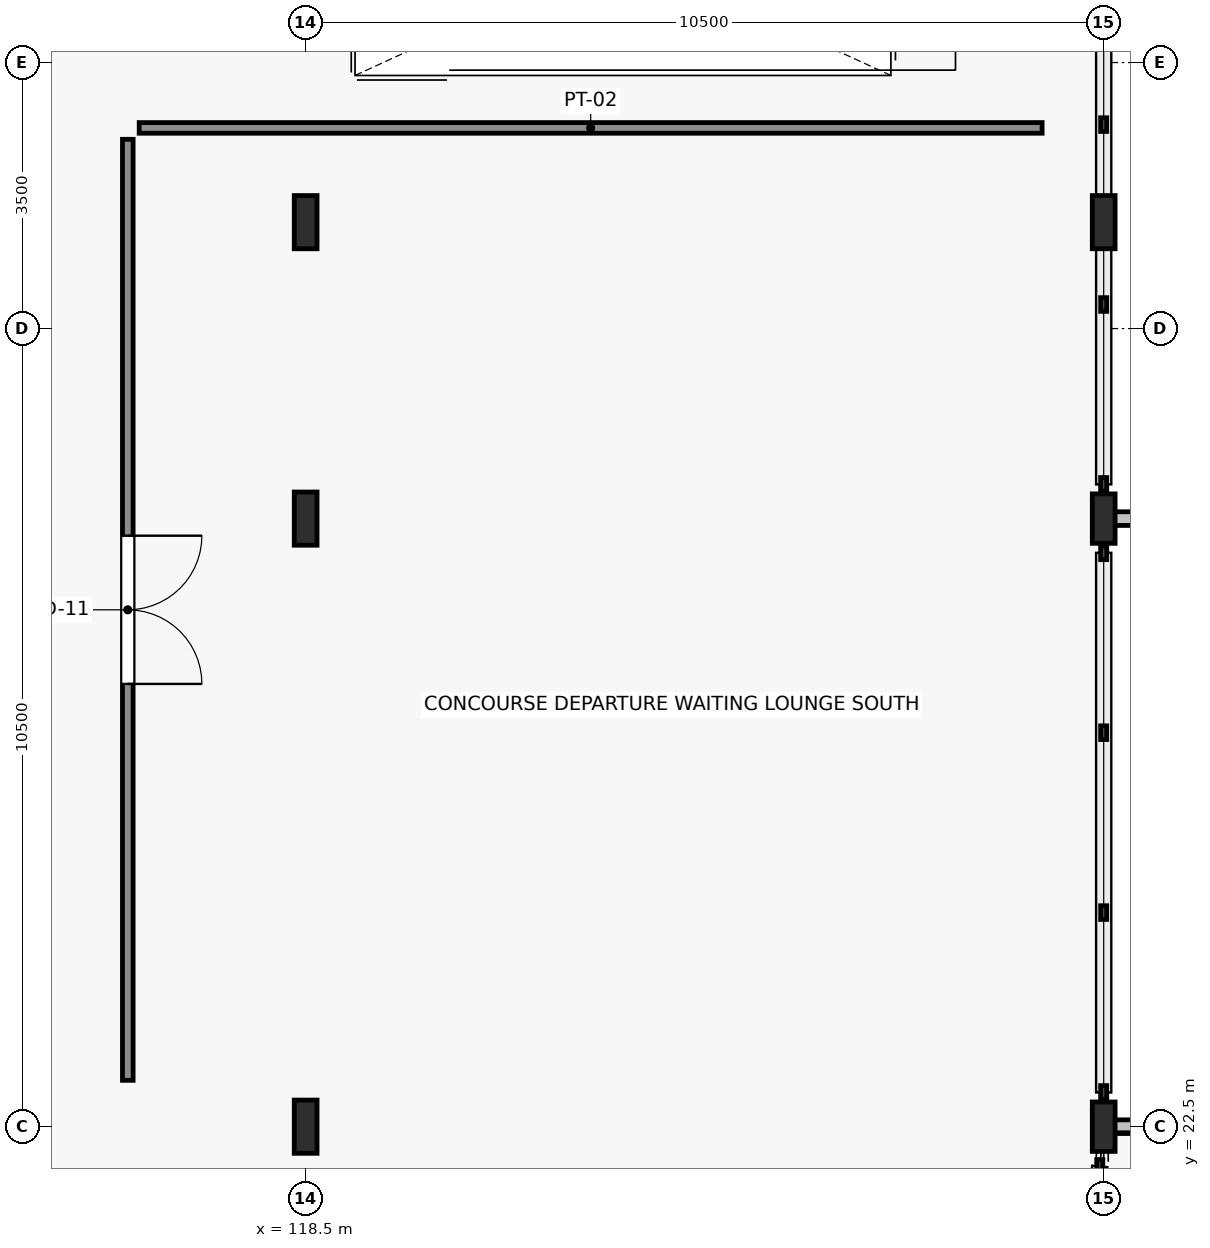
"""IFC4 building model, lengths in metres.
Left out: names, types, materials, properties, quantities, classifications, styles, units other than length and angle.
Written with IfcOpenShell. Run it as: python <this file> out.ifc"""

import sys

from ifc_helpers import new_model, si_unit, direction, frame, frame_2d, origin, origin_2d, place, context, subcontext, project, spatial, rectangle, i_section, extrude, element, fill, save


model = new_model("IFC4")
c1 = context("Model", 3, precision=1e-05, world=origin(), true_north=direction((0.0, 1.0)))
c2 = subcontext(c1, "Body", "Model", "MODEL_VIEW")
j1 = project(units=[si_unit("LENGTHUNIT", "METRE"), si_unit("PLANEANGLEUNIT", "RADIAN")], contexts=[c1])
p1 = place(None, origin())
s1 = spatial("IfcSite", under=j1, at=p1, CompositionType="ELEMENT")
p2 = place(p1, origin())
s2 = spatial("IfcBuilding", under=s1, at=p2, CompositionType="ELEMENT")
p3 = place(p2, frame((0.0, 0.0, 9.8)))
s3 = spatial("IfcBuildingStorey", under=s2, at=p3, CompositionType="ELEMENT", Elevation=9.8)
p4 = place(p3, frame((118.5, 22.5, 0.0), z_axis=(0.0, 0.0, 1.0), x_axis=(1.0, 0.0, 0.0)))
e1 = element("IfcColumn", 1, at=p4, inside=s3, PredefinedType="COLUMN", context=c2, shape_type="SweptSolid", body=[
    extrude(i_section(OverallWidth=0.3, OverallDepth=0.7, WebThickness=0.017, FlangeThickness=0.032, FilletRadius=0.027, at=origin_2d()), origin(), (0.0, 0.0, 1.0), 5.0),
])
p5 = place(p3, frame((129.0, 22.5, 0.0), z_axis=(0.0, 0.0, 1.0), x_axis=(1.0, 0.0, 0.0)))
e2 = element("IfcColumn", 2, at=p5, inside=s3, PredefinedType="COLUMN", context=c2, shape_type="SweptSolid", body=[
    extrude(i_section(OverallWidth=0.3, OverallDepth=0.65, WebThickness=0.016, FlangeThickness=0.031, FilletRadius=0.027, at=origin_2d()), origin(), (0.0, 0.0, 1.0), 5.2),
])
p6 = place(p3, frame((118.5, 30.5, 0.0), z_axis=(0.0, 0.0, 1.0), x_axis=(1.0, 0.0, 0.0)))
e3 = element("IfcColumn", 3, at=p6, inside=s3, PredefinedType="COLUMN", context=c2, shape_type="SweptSolid", body=[
    extrude(i_section(OverallWidth=0.3, OverallDepth=0.7, WebThickness=0.017, FlangeThickness=0.032, FilletRadius=0.027, at=origin_2d()), origin(), (0.0, 0.0, 1.0), 5.0),
])
p7 = place(p3, frame((129.0, 30.5, 0.0), z_axis=(0.0, 0.0, 1.0), x_axis=(1.0, 0.0, 0.0)))
e4 = element("IfcColumn", 4, at=p7, inside=s3, PredefinedType="COLUMN", context=c2, shape_type="SweptSolid", body=[
    extrude(i_section(OverallWidth=0.3, OverallDepth=0.65, WebThickness=0.016, FlangeThickness=0.031, FilletRadius=0.027, at=origin_2d()), origin(), (0.0, 0.0, 1.0), 5.2),
])
for number, where, z_axis, x_axis in (
    (5, (118.5, 34.4, 0.0), (0.0, 0.0, 1.0), (1.0, 0.0, 0.0)),
    (6, (129.0, 34.4, 0.0), (0.0, 0.0, 1.0), (1.0, 0.0, 0.0)),
):
    element("IfcColumn", number, at=place(p3, frame(where, z_axis=z_axis, x_axis=x_axis)), inside=s3, PredefinedType="COLUMN", context=c2, shape_type="SweptSolid", body=[
        extrude(i_section(OverallWidth=0.3, OverallDepth=0.7, WebThickness=0.017, FlangeThickness=0.032, FilletRadius=0.027, at=origin_2d()), origin(), (0.0, 0.0, 1.0), 4.995),
    ])
p8 = place(p3, frame((116.16, 35.49, 0.0), z_axis=(0.0, 0.0, 1.0), x_axis=(0.0, -1.0, 0.0)))
e7 = element("IfcWall", 7, at=p8, inside=s3, PredefinedType="PARTITIONING", context=c2, shape_type="SweptSolid", body=[
    extrude(rectangle(XDim=12.38, YDim=0.14, at=frame_2d((6.19, 0.0))), origin(), (0.0, 0.0, 1.0), 4.575),
])
p9 = place(p8, frame((5.215, 0.0, 0.0)))
e8 = element("IfcOpeningElement", 8, at=p9, cuts=e7, PredefinedType="OPENING", context=c2, shape_type="SweptSolid", body=[
    extrude(rectangle(XDim=1.95, YDim=2.35, at=frame_2d((0.975, 1.175))), frame((0.0, 0.08, 0.0), z_axis=(0.0, -1.0, 0.0), x_axis=(1.0, 0.0, 0.0)), (0.0, 0.0, 1.0), 0.16),
])
p10 = place(p3, frame((116.31, 35.64, 0.0), z_axis=(0.0, 0.0, 1.0), x_axis=(1.0, 0.0, 0.0)))
e9 = element("IfcWall", 9, at=p10, inside=s3, PredefinedType="PARTITIONING", context=c2, shape_type="SweptSolid", body=[
    extrude(rectangle(XDim=11.88, YDim=0.14, at=frame_2d((5.94, 0.0))), origin(), (0.0, 0.0, 1.0), 4.95),
])
p11 = place(p9, origin())
e10 = element("IfcDoor", 10, at=p11, inside=s3, OperationType="DOUBLE_DOOR_SINGLE_SWING", PredefinedType="DOOR", context=c2, shape_type="SweptSolid", body=[
    extrude(rectangle(XDim=1.95, YDim=2.35, at=frame_2d((0.975, 1.175))), frame((0.0, 0.025, 0.0), z_axis=(0.0, -1.0, 0.0), x_axis=(1.0, 0.0, 0.0)), (0.0, 0.0, 1.0), 0.05),
])
fill(e8, e10)
save(model, sys.argv[1])
